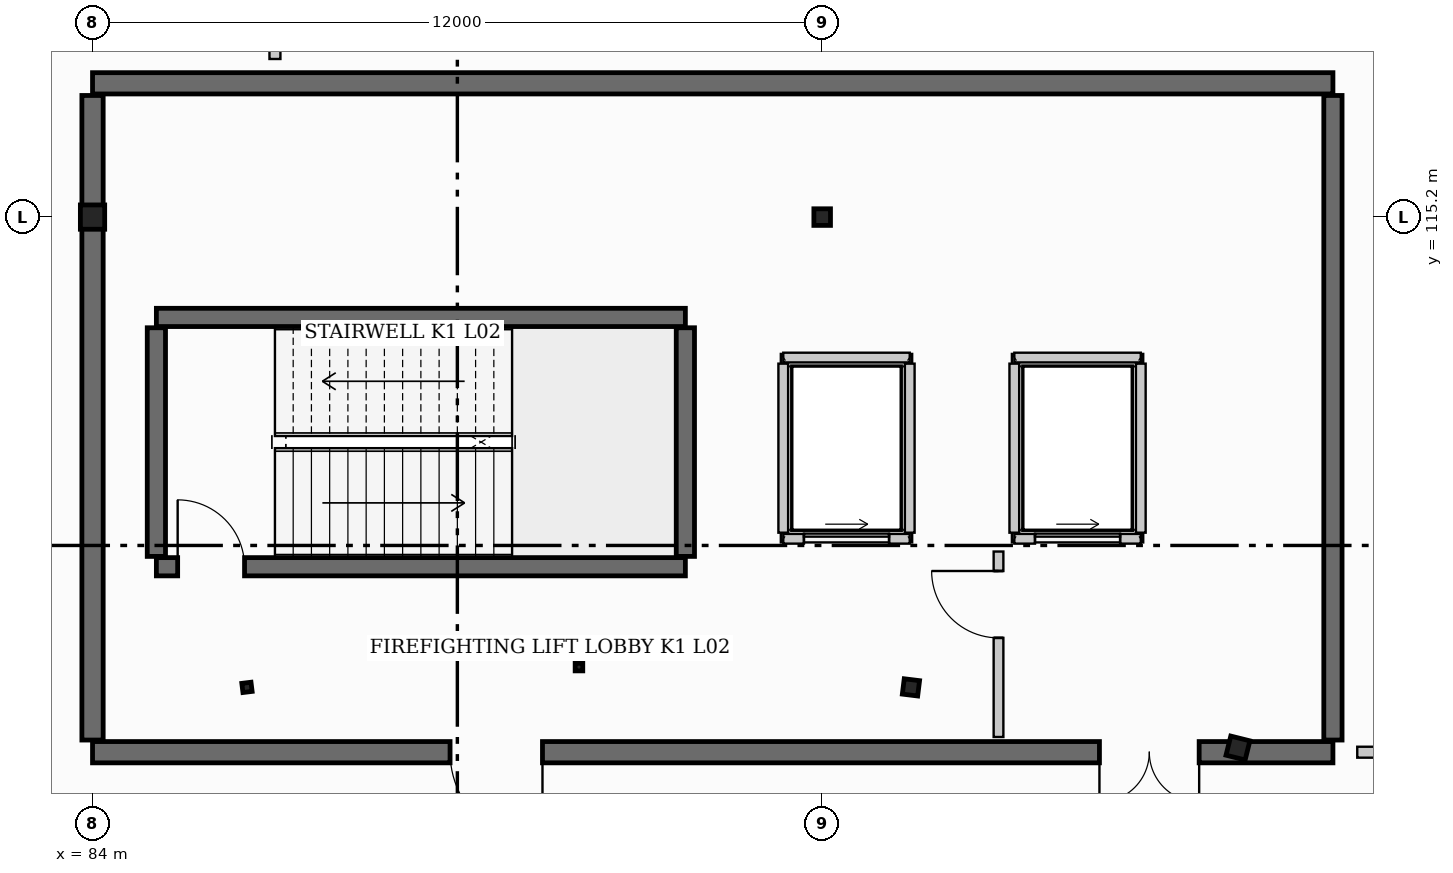
"""IFC4 building model, lengths in metres.
Left out: names, types, materials, properties, quantities, classifications, styles, units other than length and angle.
Written with IfcOpenShell. Run it as: python <this file> out.ifc"""

import sys

from ifc_helpers import new_model, si_unit, direction, frame, frame_2d, origin, origin_2d, place, context, subcontext, project, spatial, rectangle, hollow_rectangle, hollow_circle, i_section, extrude, element, fill, save


model = new_model("IFC4")
c1 = context("Model", 3, precision=1e-05, world=origin(), true_north=direction((0.0, 1.0)))
c2 = subcontext(c1, "Body", "Model", "MODEL_VIEW")
j1 = project(units=[si_unit("LENGTHUNIT", "METRE"), si_unit("PLANEANGLEUNIT", "RADIAN")], contexts=[c1])
p1 = place(None, origin())
s1 = spatial("IfcSite", under=j1, at=p1, CompositionType="ELEMENT")
p2 = place(p1, origin())
s2 = spatial("IfcBuilding", under=s1, at=p2, CompositionType="ELEMENT")
p3 = place(p2, frame((0.0, 0.0, 9.6)))
s3 = spatial("IfcBuildingStorey", under=s2, at=p3, CompositionType="ELEMENT", Elevation=9.6)
p4 = place(p3, frame((84.0, 115.2, 0.0), z_axis=(0.0, 0.0, 1.0), x_axis=(0.0, 1.0, 0.0)))
e1 = element("IfcColumn", 1, at=p4, inside=s3, PredefinedType="COLUMN", context=c2, shape_type="SweptSolid", body=[
    extrude(i_section(OverallWidth=0.4, OverallDepth=0.4, WebThickness=0.02, FlangeThickness=0.028, at=origin_2d()), origin(), (0.0, 0.0, 1.0), 4.8),
])
p5 = place(p3, frame((96.0, 115.2, 0.0), z_axis=(0.0, 0.0, 1.0), x_axis=(1.0, 0.0, 0.0)))
e2 = element("IfcColumn", 2, at=p5, inside=s3, PredefinedType="COLUMN", context=c2, shape_type="SweptSolid", body=[
    extrude(hollow_circle(Radius=0.136, WallThickness=0.013, at=origin_2d()), origin(), (0.0, 0.0, 1.0), 4.8),
])
p6 = place(p3, frame((86.54, 107.466, 0.0), z_axis=(0.0, 0.0, 1.0), x_axis=(-0.121869343405, 0.992546151641, 0.0)))
e3 = element("IfcColumn", 3, at=p6, inside=s3, PredefinedType="COLUMN", context=c2, shape_type="SweptSolid", body=[
    extrude(i_section(OverallWidth=0.152, OverallDepth=0.152, WebThickness=0.006, FlangeThickness=0.007, at=origin_2d()), origin(), (0.0, 0.0, 1.0), 4.8),
])
p7 = place(p3, frame((92.0, 107.8, 0.0), z_axis=(0.0, 0.0, 1.0), x_axis=(0.0, 1.0, 0.0)))
e4 = element("IfcColumn", 4, at=p7, inside=s3, PredefinedType="COLUMN", context=c2, shape_type="SweptSolid", body=[
    extrude(hollow_rectangle(XDim=0.125, YDim=0.125, WallThickness=0.006, at=origin_2d()), origin(), (0.0, 0.0, 1.0), 4.8),
])
p8 = place(p3, frame((97.46, 107.466, 0.0), z_axis=(0.0, 0.0, 1.0), x_axis=(0.121869343405, 0.992546151641, 0.0)))
e5 = element("IfcColumn", 5, at=p8, inside=s3, PredefinedType="COLUMN", context=c2, shape_type="SweptSolid", body=[
    extrude(i_section(OverallWidth=0.254, OverallDepth=0.254, WebThickness=0.009, FlangeThickness=0.014, at=origin_2d()), origin(), (0.0, 0.0, 1.0), 4.8),
])
p9 = place(p3, frame((102.838, 106.469, 0.0), z_axis=(0.0, 0.0, 1.0), x_axis=(0.2419218956, 0.970295726276, 0.0)))
e6 = element("IfcColumn", 6, at=p9, inside=s3, PredefinedType="COLUMN", context=c2, shape_type="SweptSolid", body=[
    extrude(hollow_circle(Radius=0.162, WallThickness=0.013, at=origin_2d()), origin(), (0.0, 0.0, 1.0), 4.8),
])
p10 = place(p3, frame((84.0, 117.4, 0.0), z_axis=(0.0, 0.0, 1.0), x_axis=(1.0, 0.0, 0.0)))
e7 = element("IfcWall", 7, at=p10, inside=s3, PredefinedType="SHEAR", context=c2, shape_type="SweptSolid", body=[
    extrude(rectangle(XDim=20.4, YDim=0.35, at=frame_2d((10.2, 0.0))), origin(), (0.0, 0.0, 1.0), 4.8),
])
p11 = place(p3, frame((104.4, 106.4, 0.0), z_axis=(0.0, 0.0, 1.0), x_axis=(-1.0, 0.0, 0.0)))
e8 = element("IfcWall", 8, at=p11, inside=s3, PredefinedType="SHEAR", context=c2, shape_type="SweptSolid", body=[
    extrude(rectangle(XDim=20.4, YDim=0.35, at=frame_2d((10.2, 0.0))), origin(), (0.0, 0.0, 1.0), 4.8),
])
p12 = place(p11, frame((2.2, 0.0, 0.0)))
e9 = element("IfcOpeningElement", 9, at=p12, cuts=e8, PredefinedType="OPENING", context=c2, shape_type="SweptSolid", body=[
    extrude(rectangle(XDim=1.64, YDim=2.2, at=frame_2d((0.82, 1.1))), frame((0.0, 0.185, 0.0), z_axis=(0.0, -1.0, 0.0), x_axis=(1.0, 0.0, 0.0)), (0.0, 0.0, 1.0), 0.37),
])
p13 = place(p11, frame((13.0, 0.0, 0.0)))
e10 = element("IfcOpeningElement", 10, at=p13, cuts=e8, PredefinedType="OPENING", context=c2, shape_type="SweptSolid", body=[
    extrude(rectangle(XDim=1.52, YDim=2.16, at=frame_2d((0.76, 1.08))), frame((0.0, 0.185, 0.0), z_axis=(0.0, -1.0, 0.0), x_axis=(1.0, 0.0, 0.0)), (0.0, 0.0, 1.0), 0.37),
])
p14 = place(p3, frame((84.0, 106.6, 0.0), z_axis=(0.0, 0.0, 1.0), x_axis=(0.0, 1.0, 0.0)))
e11 = element("IfcWall", 11, at=p14, inside=s3, PredefinedType="SHEAR", context=c2, shape_type="SweptSolid", body=[
    extrude(rectangle(XDim=10.6, YDim=0.35, at=frame_2d((5.3, 0.0))), origin(), (0.0, 0.0, 1.0), 4.8),
])
p15 = place(p3, frame((104.4, 117.2, 0.0), z_axis=(0.0, 0.0, 1.0), x_axis=(0.0, -1.0, 0.0)))
e12 = element("IfcWall", 12, at=p15, inside=s3, PredefinedType="SHEAR", context=c2, shape_type="SweptSolid", body=[
    extrude(rectangle(XDim=10.6, YDim=0.3, at=frame_2d((5.3, 0.0))), origin(), (0.0, 0.0, 1.0), 4.8),
])
p16 = place(p3, frame((85.05, 109.45, 0.0), z_axis=(0.0, 0.0, 1.0), x_axis=(1.0, 0.0, 0.0)))
e13 = element("IfcWall", 13, at=p16, inside=s3, PredefinedType="SHEAR", context=c2, shape_type="SweptSolid", body=[
    extrude(rectangle(XDim=8.7, YDim=0.3, at=frame_2d((4.35, 0.0))), origin(), (0.0, 0.0, 1.0), 4.8),
])
p17 = place(p16, frame((0.35, 0.0, 0.0)))
e14 = element("IfcOpeningElement", 14, at=p17, cuts=e13, PredefinedType="OPENING", context=c2, shape_type="SweptSolid", body=[
    extrude(rectangle(XDim=1.1, YDim=2.15, at=frame_2d((0.55, 1.075))), frame((0.0, 0.16, 0.0), z_axis=(0.0, -1.0, 0.0), x_axis=(1.0, 0.0, 0.0)), (0.0, 0.0, 1.0), 0.32),
])
p18 = place(p3, frame((93.75, 113.55, 0.0), z_axis=(0.0, 0.0, 1.0), x_axis=(-1.0, 0.0, 0.0)))
e15 = element("IfcWall", 15, at=p18, inside=s3, PredefinedType="SHEAR", context=c2, shape_type="SweptSolid", body=[
    extrude(rectangle(XDim=8.7, YDim=0.3, at=frame_2d((4.35, 0.0))), origin(), (0.0, 0.0, 1.0), 4.8),
])
for number, where, z_axis, x_axis in (
    (16, (85.05, 109.62, 0.0), (0.0, 0.0, 1.0), (0.0, 1.0, 0.0)),
    (17, (93.75, 109.62, 0.0), (0.0, 0.0, 1.0), (0.0, 1.0, 0.0)),
):
    element("IfcWall", number, at=place(p3, frame(where, z_axis=z_axis, x_axis=x_axis)), inside=s3, PredefinedType="SHEAR", context=c2, shape_type="SweptSolid", body=[
        extrude(rectangle(XDim=3.76, YDim=0.3, at=frame_2d((1.88, 0.0))), origin(), (0.0, 0.0, 1.0), 4.8),
    ])
p19 = place(p3, frame((95.36, 109.91, 0.0), z_axis=(0.0, 0.0, 1.0), x_axis=(1.0, 0.0, 0.0)))
e18 = element("IfcWall", 18, at=p19, inside=s3, PredefinedType="PARTITIONING", context=c2, shape_type="SweptSolid", body=[
    extrude(rectangle(XDim=2.08, YDim=0.16, at=frame_2d((1.04, 0.0))), origin(), (0.0, 0.0, 1.0), 4.43),
])
p20 = place(p19, frame((0.34, 0.0, 0.0)))
e19 = element("IfcOpeningElement", 19, at=p20, cuts=e18, PredefinedType="OPENING", context=c2, shape_type="SweptSolid", body=[
    extrude(rectangle(XDim=1.4, YDim=2.2, at=frame_2d((0.7, 1.1))), frame((0.0, 0.09, 0.0), z_axis=(0.0, -1.0, 0.0), x_axis=(1.0, 0.0, 0.0)), (0.0, 0.0, 1.0), 0.18),
])
p21 = place(p3, frame((97.44, 112.89, 0.0), z_axis=(0.0, 0.0, 1.0), x_axis=(-1.0, 0.0, 0.0)))
e20 = element("IfcWall", 20, at=p21, inside=s3, PredefinedType="PARTITIONING", context=c2, shape_type="SweptSolid", body=[
    extrude(rectangle(XDim=2.08, YDim=0.16, at=frame_2d((1.04, 0.0))), origin(), (0.0, 0.0, 1.0), 4.43),
])
for number, where, z_axis, x_axis in (
    (21, (95.36, 112.79, 0.0), (0.0, 0.0, 1.0), (0.0, -1.0, 0.0)),
    (22, (97.44, 110.01, 0.0), (0.0, 0.0, 1.0), (0.0, 1.0, 0.0)),
):
    element("IfcWall", number, at=place(p3, frame(where, z_axis=z_axis, x_axis=x_axis)), inside=s3, PredefinedType="PARTITIONING", context=c2, shape_type="SweptSolid", body=[
        extrude(rectangle(XDim=2.78, YDim=0.16, at=frame_2d((1.39, 0.0))), origin(), (0.0, 0.0, 1.0), 4.43),
    ])
p22 = place(p3, frame((99.16, 109.91, 0.0), z_axis=(0.0, 0.0, 1.0), x_axis=(1.0, 0.0, 0.0)))
e23 = element("IfcWall", 23, at=p22, inside=s3, PredefinedType="PARTITIONING", context=c2, shape_type="SweptSolid", body=[
    extrude(rectangle(XDim=2.08, YDim=0.16, at=frame_2d((1.04, 0.0))), origin(), (0.0, 0.0, 1.0), 4.43),
])
p23 = place(p22, frame((0.34, 0.0, 0.0)))
e24 = element("IfcOpeningElement", 24, at=p23, cuts=e23, PredefinedType="OPENING", context=c2, shape_type="SweptSolid", body=[
    extrude(rectangle(XDim=1.4, YDim=2.2, at=frame_2d((0.7, 1.1))), frame((0.0, 0.09, 0.0), z_axis=(0.0, -1.0, 0.0), x_axis=(1.0, 0.0, 0.0)), (0.0, 0.0, 1.0), 0.18),
])
p24 = place(p3, frame((101.24, 112.89, 0.0), z_axis=(0.0, 0.0, 1.0), x_axis=(-1.0, 0.0, 0.0)))
e25 = element("IfcWall", 25, at=p24, inside=s3, PredefinedType="PARTITIONING", context=c2, shape_type="SweptSolid", body=[
    extrude(rectangle(XDim=2.08, YDim=0.16, at=frame_2d((1.04, 0.0))), origin(), (0.0, 0.0, 1.0), 4.43),
])
for number, where, z_axis, x_axis in (
    (26, (99.16, 112.79, 0.0), (0.0, 0.0, 1.0), (0.0, -1.0, 0.0)),
    (27, (101.24, 110.01, 0.0), (0.0, 0.0, 1.0), (0.0, 1.0, 0.0)),
):
    element("IfcWall", number, at=place(p3, frame(where, z_axis=z_axis, x_axis=x_axis)), inside=s3, PredefinedType="PARTITIONING", context=c2, shape_type="SweptSolid", body=[
        extrude(rectangle(XDim=2.78, YDim=0.16, at=frame_2d((1.39, 0.0))), origin(), (0.0, 0.0, 1.0), 4.43),
    ])
p25 = place(p3, frame((98.9, 106.65, 0.0), z_axis=(0.0, 0.0, 1.0), x_axis=(0.0, 1.0, 0.0)))
e28 = element("IfcWall", 28, at=p25, inside=s3, PredefinedType="PARTITIONING", context=c2, shape_type="SweptSolid", body=[
    extrude(rectangle(XDim=3.05, YDim=0.16, at=frame_2d((1.525, 0.0))), origin(), (0.0, 0.0, 1.0), 4.165),
])
p26 = place(p25, frame((1.63, 0.0, 0.0)))
e29 = element("IfcOpeningElement", 29, at=p26, cuts=e28, PredefinedType="OPENING", context=c2, shape_type="SweptSolid", body=[
    extrude(rectangle(XDim=1.1, YDim=2.15, at=frame_2d((0.55, 1.075))), frame((0.0, 0.09, 0.0), z_axis=(0.0, -1.0, 0.0), x_axis=(1.0, 0.0, 0.0)), (0.0, 0.0, 1.0), 0.18),
])
p27 = place(p3, frame((87.0, 117.8, 0.0), z_axis=(0.0, 0.0, 1.0), x_axis=(0.0, 1.0, 0.0)))
e30 = element("IfcWall", 30, at=p27, inside=s3, PredefinedType="PARTITIONING", context=c2, shape_type="SweptSolid", body=[
    extrude(rectangle(XDim=7.9, YDim=0.18, at=frame_2d((3.95, 0.0))), origin(), (0.0, 0.0, 1.0), 4.212),
])
p28 = place(p3, frame((104.8, 106.4, 0.0), z_axis=(0.0, 0.0, 1.0), x_axis=(1.0, 0.0, 0.0)))
e31 = element("IfcWall", 31, at=p28, inside=s3, PredefinedType="PARTITIONING", context=c2, shape_type="SweptSolid", body=[
    extrude(rectangle(XDim=6.35, YDim=0.18, at=frame_2d((3.175, 0.0))), origin(), (0.0, 0.0, 1.0), 3.958),
])
p29 = place(p28, frame((0.32, 0.0, 0.0)))
e32 = element("IfcOpeningElement", 32, at=p29, cuts=e31, PredefinedType="OPENING", context=c2, shape_type="SweptSolid", body=[
    extrude(rectangle(XDim=1.52, YDim=2.16, at=frame_2d((0.76, 1.08))), frame((0.0, 0.1, 0.0), z_axis=(0.0, -1.0, 0.0), x_axis=(1.0, 0.0, 0.0)), (0.0, 0.0, 1.0), 0.2),
])
p30 = place(p20, origin())
e33 = element("IfcDoor", 33, at=p30, inside=s3, OperationType="SLIDING_TO_RIGHT", PredefinedType="DOOR", context=c2, shape_type="SweptSolid", body=[
    extrude(rectangle(XDim=1.4, YDim=2.2, at=frame_2d((0.7, 1.1))), frame((0.0, 0.025, 0.0), z_axis=(0.0, -1.0, 0.0), x_axis=(1.0, 0.0, 0.0)), (0.0, 0.0, 1.0), 0.05),
])
fill(e19, e33)
p31 = place(p23, origin())
e34 = element("IfcDoor", 34, at=p31, inside=s3, OperationType="SLIDING_TO_RIGHT", PredefinedType="DOOR", context=c2, shape_type="SweptSolid", body=[
    extrude(rectangle(XDim=1.4, YDim=2.2, at=frame_2d((0.7, 1.1))), frame((0.0, 0.025, 0.0), z_axis=(0.0, -1.0, 0.0), x_axis=(1.0, 0.0, 0.0)), (0.0, 0.0, 1.0), 0.05),
])
fill(e24, e34)
p32 = place(p17, origin())
e35 = element("IfcDoor", 35, at=p32, inside=s3, OperationType="SINGLE_SWING_LEFT", PredefinedType="DOOR", context=c2, shape_type="SweptSolid", body=[
    extrude(rectangle(XDim=1.1, YDim=2.15, at=frame_2d((0.55, 1.075))), frame((0.0, 0.025, 0.0), z_axis=(0.0, -1.0, 0.0), x_axis=(1.0, 0.0, 0.0)), (0.0, 0.0, 1.0), 0.05),
])
fill(e14, e35)
p33 = place(p12, origin())
e36 = element("IfcDoor", 36, at=p33, inside=s3, OperationType="DOUBLE_DOOR_SINGLE_SWING", PredefinedType="DOOR", context=c2, shape_type="SweptSolid", body=[
    extrude(rectangle(XDim=1.64, YDim=2.2, at=frame_2d((0.82, 1.1))), frame((0.0, 0.025, 0.0), z_axis=(0.0, -1.0, 0.0), x_axis=(1.0, 0.0, 0.0)), (0.0, 0.0, 1.0), 0.05),
])
fill(e9, e36)
p34 = place(p13, origin())
e37 = element("IfcDoor", 37, at=p34, inside=s3, OperationType="SINGLE_SWING_LEFT", PredefinedType="DOOR", context=c2, shape_type="SweptSolid", body=[
    extrude(rectangle(XDim=1.52, YDim=2.16, at=frame_2d((0.76, 1.08))), frame((0.0, 0.025, 0.0), z_axis=(0.0, -1.0, 0.0), x_axis=(1.0, 0.0, 0.0)), (0.0, 0.0, 1.0), 0.05),
])
fill(e10, e37)
p35 = place(p26, origin())
e38 = element("IfcDoor", 38, at=p35, inside=s3, OperationType="SINGLE_SWING_RIGHT", PredefinedType="DOOR", context=c2, shape_type="SweptSolid", body=[
    extrude(rectangle(XDim=1.1, YDim=2.15, at=frame_2d((0.55, 1.075))), frame((0.0, 0.025, 0.0), z_axis=(0.0, -1.0, 0.0), x_axis=(1.0, 0.0, 0.0)), (0.0, 0.0, 1.0), 0.05),
])
fill(e29, e38)
save(model, sys.argv[1])
